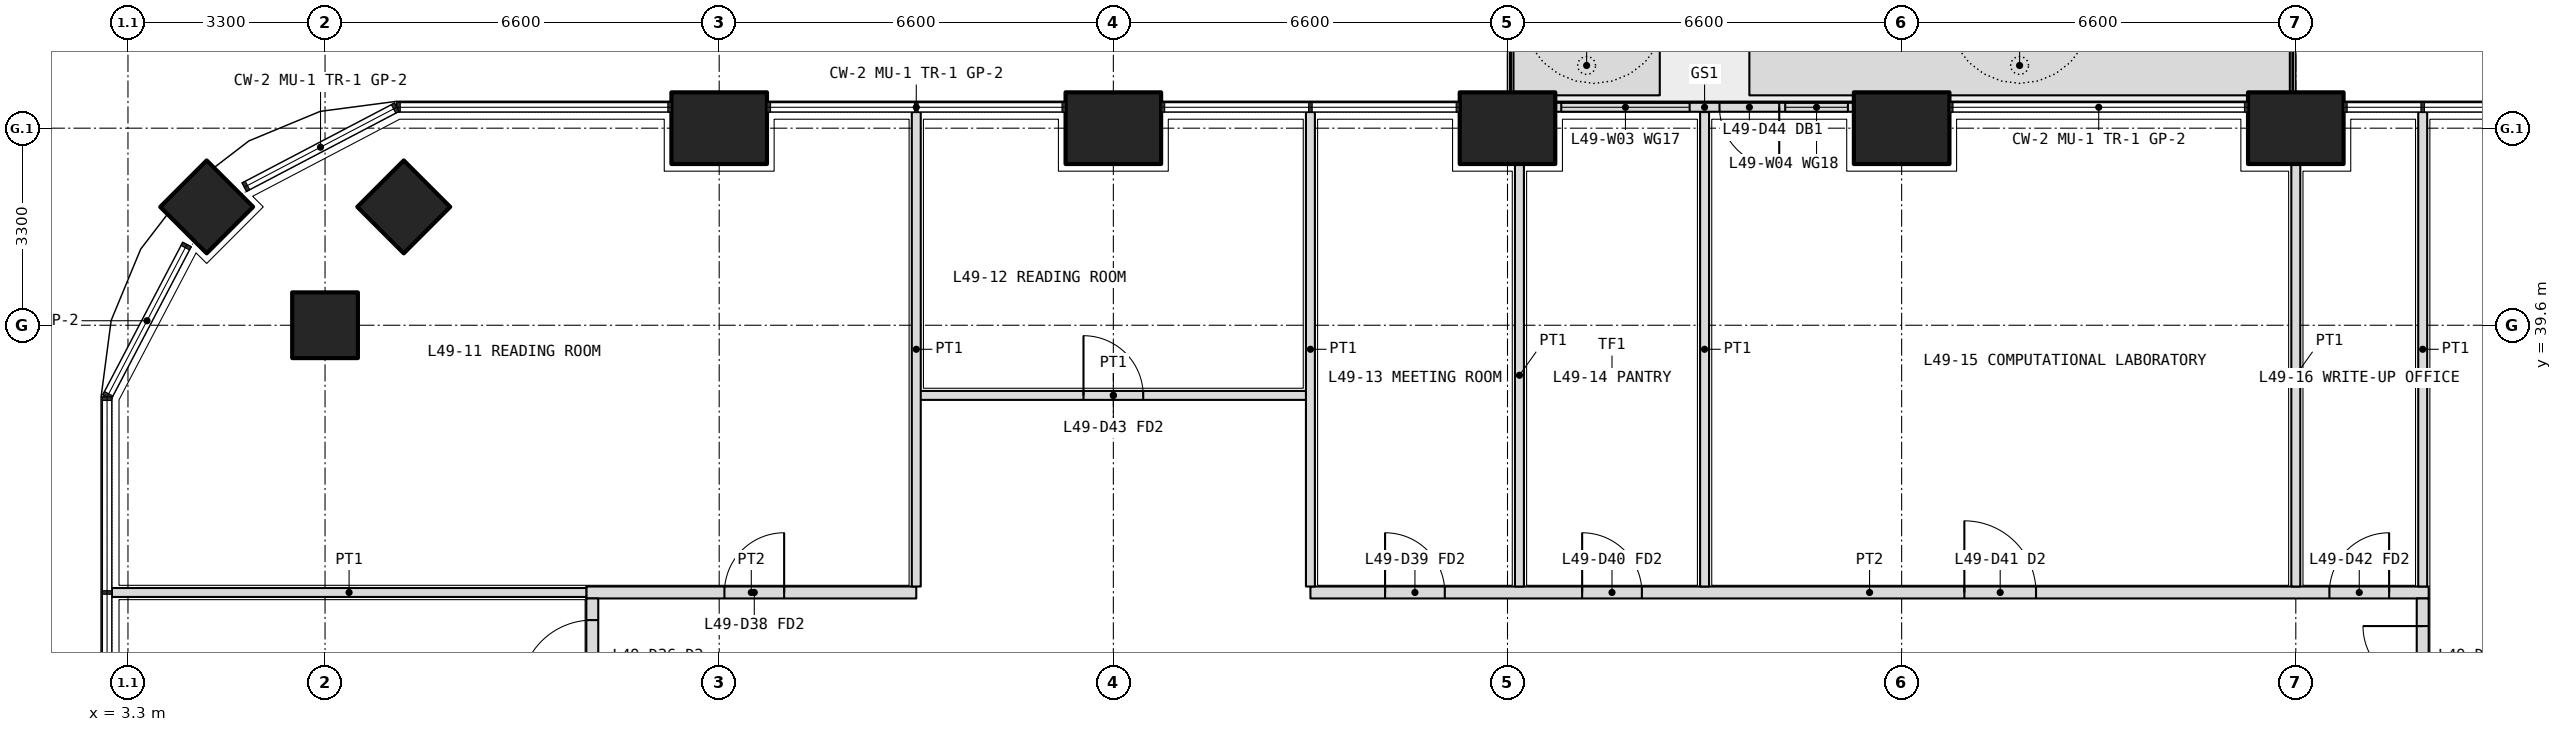
"""IFC4 building model, lengths in metres.
Left out: names, types, materials, properties, quantities, classifications, styles, units other than length and angle.
Written with IfcOpenShell. Run it as: python <this file> out.ifc"""

import sys

from ifc_helpers import new_model, si_unit, direction, frame, frame_2d, origin, origin_2d, place, context, subcontext, project, spatial, polyline, rectangle, outline, extrude, element, fill, save


model = new_model("IFC4")
c1 = context("Model", 3, precision=1e-05, world=origin(), true_north=direction((0.0, 1.0)))
c2 = subcontext(c1, "Body", "Model", "MODEL_VIEW")
j1 = project(units=[si_unit("LENGTHUNIT", "METRE"), si_unit("PLANEANGLEUNIT", "RADIAN")], contexts=[c1])
p1 = place(None, origin())
s1 = spatial("IfcSite", under=j1, at=p1, CompositionType="ELEMENT")
p2 = place(p1, origin())
s2 = spatial("IfcBuilding", under=s1, at=p2, CompositionType="ELEMENT")
p3 = place(p2, frame((0.0, 0.0, 214.5)))
s3 = spatial("IfcBuildingStorey", under=s2, at=p3, CompositionType="ELEMENT", Elevation=214.5)
p4 = place(p3, frame((4.618, 41.582, 0.0), z_axis=(0.0, 0.0, 1.0), x_axis=(0.707106781187, 0.707106781187, 0.0)))
e1 = element("IfcColumn", 1, at=p4, inside=s3, PredefinedType="COLUMN", context=c2, shape_type="SweptSolid", body=[
    extrude(rectangle(XDim=1.1, YDim=1.1, at=origin_2d()), origin(), (0.0, 0.0, 1.0), 4.2),
])
for number, where, z_axis, x_axis in (
    (2, (13.2, 42.9, 0.0), (0.0, 0.0, 1.0), (1.0, 0.0, 0.0)),
    (3, (19.8, 42.9, 0.0), (0.0, 0.0, 1.0), (1.0, 0.0, 0.0)),
    (4, (26.4, 42.9, 0.0), (0.0, 0.0, 1.0), (1.0, 0.0, 0.0)),
    (5, (33.0, 42.9, 0.0), (0.0, 0.0, 1.0), (1.0, 0.0, 0.0)),
    (6, (39.6, 42.9, 0.0), (0.0, 0.0, 1.0), (1.0, 0.0, 0.0)),
):
    element("IfcColumn", number, at=place(p3, frame(where, z_axis=z_axis, x_axis=x_axis)), inside=s3, PredefinedType="COLUMN", context=c2, shape_type="SweptSolid", body=[
        extrude(rectangle(XDim=1.6, YDim=1.2, at=origin_2d()), origin(), (0.0, 0.0, 1.0), 4.2),
    ])
for number, where, z_axis, x_axis in (
    (7, (6.6, 39.6, 0.0), (0.0, 0.0, 1.0), (1.0, 0.0, 0.0)),
    (8, (7.918, 41.582, 0.0), (0.0, 0.0, 1.0), (0.707, 0.707, 0.0)),
):
    element("IfcColumn", number, at=place(p3, frame(where, z_axis=z_axis, x_axis=x_axis)), inside=s3, PredefinedType="COLUMN", context=c2, shape_type="SweptSolid", body=[
        extrude(rectangle(XDim=1.1, YDim=1.1, at=origin_2d()), origin(), (0.0, 0.0, 1.0), 4.2),
    ])
p5 = place(p3, origin())
e9 = element("IfcWall", 9, at=p5, inside=s3, PredefinedType="USERDEFINED", context=c2, shape_type="SweptSolid", body=[
    extrude(outline(polyline([(26.5, 43.45), (28.95, 43.45), (28.95, 44.45), (26.5, 44.45), (26.5, 43.45)]), holes=[polyline([(26.65, 43.6), (28.8, 43.6), (28.8, 44.3), (26.65, 44.3), (26.65, 43.6)])]), origin(), (0.0, 0.0, 1.0), 1.05),
])
p6 = place(p3, origin())
e10 = element("IfcWall", 10, at=p6, inside=s3, PredefinedType="USERDEFINED", context=c2, shape_type="SweptSolid", body=[
    extrude(outline(polyline([(30.45, 43.45), (39.5, 43.45), (39.5, 44.45), (30.45, 44.45), (30.45, 43.45)]), holes=[polyline([(30.6, 43.6), (39.35, 43.6), (39.35, 44.3), (30.6, 44.3), (30.6, 43.6)])]), origin(), (0.0, 0.0, 1.0), 1.05),
])
p7 = place(p3, frame((32.2, 43.25, 0.0), z_axis=(0.0, 0.0, 1.0), x_axis=(-1.0, 0.0, 0.0)))
e11 = element("IfcWall", 11, at=p7, inside=s3, PredefinedType="SOLIDWALL", context=c2, shape_type="SweptSolid", body=[
    extrude(rectangle(XDim=5.0, YDim=0.15, at=frame_2d((2.5, 0.0))), origin(), (0.0, 0.0, 1.0), 2.6),
])
p8 = place(p7, frame((1.25, 0.0, 0.0)))
e12 = element("IfcOpeningElement", 12, at=p8, cuts=e11, PredefinedType="OPENING", context=c2, shape_type="SweptSolid", body=[
    extrude(rectangle(XDim=1.0, YDim=2.4, at=frame_2d((0.5, 1.2))), frame((0.0, 0.085, 0.0), z_axis=(0.0, -1.0, 0.0), x_axis=(1.0, 0.0, 0.0)), (0.0, 0.0, 1.0), 0.17),
])
p9 = place(p7, frame((0.1, 0.0, 0.1)))
e13 = element("IfcOpeningElement", 13, at=p9, cuts=e11, PredefinedType="OPENING", context=c2, shape_type="SweptSolid", body=[
    extrude(rectangle(XDim=1.05, YDim=2.2, at=frame_2d((0.525, 1.1))), frame((0.0, 0.085, 0.0), z_axis=(0.0, -1.0, 0.0), x_axis=(1.0, 0.0, 0.0)), (0.0, 0.0, 1.0), 0.17),
])
p10 = place(p7, frame((2.75, 0.0, 0.1)))
e14 = element("IfcOpeningElement", 14, at=p10, cuts=e11, PredefinedType="OPENING", context=c2, shape_type="SweptSolid", body=[
    extrude(rectangle(XDim=2.15, YDim=2.2, at=frame_2d((1.075, 1.1))), frame((0.0, 0.085, 0.0), z_axis=(0.0, -1.0, 0.0), x_axis=(1.0, 0.0, 0.0)), (0.0, 0.0, 1.0), 0.17),
])
p11 = place(p3, frame((10.975, 35.125, 0.0), z_axis=(0.0, 0.0, 1.0), x_axis=(1.0, 0.0, 0.0)))
e15 = element("IfcWall", 15, at=p11, inside=s3, PredefinedType="PARTITIONING", context=c2, shape_type="SweptSolid", body=[
    extrude(rectangle(XDim=5.525, YDim=0.2, at=frame_2d((2.762, 0.0))), origin(), (0.0, 0.0, 1.0), 2.85),
])
p12 = place(p11, frame((2.312, 0.0, 0.0)))
e16 = element("IfcOpeningElement", 16, at=p12, cuts=e15, PredefinedType="OPENING", context=c2, shape_type="SweptSolid", body=[
    extrude(rectangle(XDim=1.0, YDim=2.1, at=frame_2d((0.5, 1.05))), frame((0.0, 0.11, 0.0), z_axis=(0.0, -1.0, 0.0), x_axis=(1.0, 0.0, 0.0)), (0.0, 0.0, 1.0), 0.22),
])
p13 = place(p3, frame((23.1, 35.125, 0.0), z_axis=(0.0, 0.0, 1.0), x_axis=(1.0, 0.0, 0.0)))
e17 = element("IfcWall", 17, at=p13, inside=s3, PredefinedType="PARTITIONING", context=c2, shape_type="SweptSolid", body=[
    extrude(rectangle(XDim=18.725, YDim=0.2, at=frame_2d((9.362, 0.0))), origin(), (0.0, 0.0, 1.0), 2.85),
])
p14 = place(p13, frame((1.25, 0.0, 0.0)))
e18 = element("IfcOpeningElement", 18, at=p14, cuts=e17, PredefinedType="OPENING", context=c2, shape_type="SweptSolid", body=[
    extrude(rectangle(XDim=1.0, YDim=2.1, at=frame_2d((0.5, 1.05))), frame((0.0, 0.11, 0.0), z_axis=(0.0, -1.0, 0.0), x_axis=(1.0, 0.0, 0.0)), (0.0, 0.0, 1.0), 0.22),
])
p15 = place(p13, frame((4.55, 0.0, 0.0)))
e19 = element("IfcOpeningElement", 19, at=p15, cuts=e17, PredefinedType="OPENING", context=c2, shape_type="SweptSolid", body=[
    extrude(rectangle(XDim=1.0, YDim=2.1, at=frame_2d((0.5, 1.05))), frame((0.0, 0.11, 0.0), z_axis=(0.0, -1.0, 0.0), x_axis=(1.0, 0.0, 0.0)), (0.0, 0.0, 1.0), 0.22),
])
p16 = place(p13, frame((10.95, 0.0, 0.0)))
e20 = element("IfcOpeningElement", 20, at=p16, cuts=e17, PredefinedType="OPENING", context=c2, shape_type="SweptSolid", body=[
    extrude(rectangle(XDim=1.2, YDim=2.1, at=frame_2d((0.6, 1.05))), frame((0.0, 0.11, 0.0), z_axis=(0.0, -1.0, 0.0), x_axis=(1.0, 0.0, 0.0)), (0.0, 0.0, 1.0), 0.22),
])
p17 = place(p13, frame((17.062, 0.0, 0.0)))
e21 = element("IfcOpeningElement", 21, at=p17, cuts=e17, PredefinedType="OPENING", context=c2, shape_type="SweptSolid", body=[
    extrude(rectangle(XDim=1.0, YDim=2.1, at=frame_2d((0.5, 1.05))), frame((0.0, 0.11, 0.0), z_axis=(0.0, -1.0, 0.0), x_axis=(1.0, 0.0, 0.0)), (0.0, 0.0, 1.0), 0.22),
])
p18 = place(p3, frame((11.075, 11.175, 0.0), z_axis=(0.0, 0.0, 1.0), x_axis=(0.0, 1.0, 0.0)))
e22 = element("IfcWall", 22, at=p18, inside=s3, PredefinedType="PARTITIONING", context=c2, shape_type="SweptSolid", body=[
    extrude(rectangle(XDim=23.85, YDim=0.2, at=frame_2d((11.925, 0.0))), origin(), (0.0, 0.0, 1.0), 2.85),
])
p19 = place(p18, frame((0.462, 0.0, 0.0)))
e23 = element("IfcOpeningElement", 23, at=p19, cuts=e22, PredefinedType="OPENING", context=c2, shape_type="SweptSolid", body=[
    extrude(rectangle(XDim=1.0, YDim=2.1, at=frame_2d((0.5, 1.05))), frame((0.0, 0.11, 0.0), z_axis=(0.0, -1.0, 0.0), x_axis=(1.0, 0.0, 0.0)), (0.0, 0.0, 1.0), 0.22),
])
p20 = place(p18, frame((2.575, 0.0, 0.0)))
e24 = element("IfcOpeningElement", 24, at=p20, cuts=e22, PredefinedType="OPENING", context=c2, shape_type="SweptSolid", body=[
    extrude(rectangle(XDim=1.0, YDim=2.1, at=frame_2d((0.5, 1.05))), frame((0.0, 0.11, 0.0), z_axis=(0.0, -1.0, 0.0), x_axis=(1.0, 0.0, 0.0)), (0.0, 0.0, 1.0), 0.22),
])
p21 = place(p18, frame((5.625, 0.0, 0.0)))
e25 = element("IfcOpeningElement", 25, at=p21, cuts=e22, PredefinedType="OPENING", context=c2, shape_type="SweptSolid", body=[
    extrude(rectangle(XDim=0.9, YDim=2.1, at=frame_2d((0.45, 1.05))), frame((0.0, 0.11, 0.0), z_axis=(0.0, -1.0, 0.0), x_axis=(1.0, 0.0, 0.0)), (0.0, 0.0, 1.0), 0.22),
])
p22 = place(p18, frame((9.425, 0.0, 0.0)))
e26 = element("IfcOpeningElement", 26, at=p22, cuts=e22, PredefinedType="OPENING", context=c2, shape_type="SweptSolid", body=[
    extrude(rectangle(XDim=0.9, YDim=2.1, at=frame_2d((0.45, 1.05))), frame((0.0, 0.11, 0.0), z_axis=(0.0, -1.0, 0.0), x_axis=(1.0, 0.0, 0.0)), (0.0, 0.0, 1.0), 0.22),
])
p23 = place(p18, frame((12.975, 0.0, 0.0)))
e27 = element("IfcOpeningElement", 27, at=p23, cuts=e22, PredefinedType="OPENING", context=c2, shape_type="SweptSolid", body=[
    extrude(rectangle(XDim=1.0, YDim=2.1, at=frame_2d((0.5, 1.05))), frame((0.0, 0.11, 0.0), z_axis=(0.0, -1.0, 0.0), x_axis=(1.0, 0.0, 0.0)), (0.0, 0.0, 1.0), 0.22),
])
p24 = place(p18, frame((16.275, 0.0, 0.0)))
e28 = element("IfcOpeningElement", 28, at=p24, cuts=e22, PredefinedType="OPENING", context=c2, shape_type="SweptSolid", body=[
    extrude(rectangle(XDim=1.2, YDim=2.1, at=frame_2d((0.6, 1.05))), frame((0.0, 0.11, 0.0), z_axis=(0.0, -1.0, 0.0), x_axis=(1.0, 0.0, 0.0)), (0.0, 0.0, 1.0), 0.22),
])
p25 = place(p18, frame((19.575, 0.0, 0.0)))
e29 = element("IfcOpeningElement", 29, at=p25, cuts=e22, PredefinedType="OPENING", context=c2, shape_type="SweptSolid", body=[
    extrude(rectangle(XDim=1.2, YDim=2.1, at=frame_2d((0.6, 1.05))), frame((0.0, 0.11, 0.0), z_axis=(0.0, -1.0, 0.0), x_axis=(1.0, 0.0, 0.0)), (0.0, 0.0, 1.0), 0.22),
])
p26 = place(p18, frame((22.288, 0.0, 0.0)))
e30 = element("IfcOpeningElement", 30, at=p26, cuts=e22, PredefinedType="OPENING", context=c2, shape_type="SweptSolid", body=[
    extrude(rectangle(XDim=1.2, YDim=2.1, at=frame_2d((0.6, 1.05))), frame((0.0, 0.11, 0.0), z_axis=(0.0, -1.0, 0.0), x_axis=(1.0, 0.0, 0.0)), (0.0, 0.0, 1.0), 0.22),
])
p27 = place(p3, frame((41.725, 11.175, 0.0), z_axis=(0.0, 0.0, 1.0), x_axis=(0.0, 1.0, 0.0)))
e31 = element("IfcWall", 31, at=p27, inside=s3, PredefinedType="PARTITIONING", context=c2, shape_type="SweptSolid", body=[
    extrude(rectangle(XDim=23.85, YDim=0.2, at=frame_2d((11.925, 0.0))), origin(), (0.0, 0.0, 1.0), 2.85),
])
p28 = place(p27, frame((3.762, 0.0, 0.0)))
e32 = element("IfcOpeningElement", 32, at=p28, cuts=e31, PredefinedType="OPENING", context=c2, shape_type="SweptSolid", body=[
    extrude(rectangle(XDim=1.0, YDim=2.1, at=frame_2d((0.5, 1.05))), frame((0.0, 0.11, 0.0), z_axis=(0.0, -1.0, 0.0), x_axis=(1.0, 0.0, 0.0)), (0.0, 0.0, 1.0), 0.22),
])
p29 = place(p27, frame((9.625, 0.0, 0.0)))
e33 = element("IfcOpeningElement", 33, at=p29, cuts=e31, PredefinedType="OPENING", context=c2, shape_type="SweptSolid", body=[
    extrude(rectangle(XDim=1.0, YDim=2.1, at=frame_2d((0.5, 1.05))), frame((0.0, 0.11, 0.0), z_axis=(0.0, -1.0, 0.0), x_axis=(1.0, 0.0, 0.0)), (0.0, 0.0, 1.0), 0.22),
])
p30 = place(p27, frame((12.975, 0.0, 0.0)))
e34 = element("IfcOpeningElement", 34, at=p30, cuts=e31, PredefinedType="OPENING", context=c2, shape_type="SweptSolid", body=[
    extrude(rectangle(XDim=0.9, YDim=2.1, at=frame_2d((0.45, 1.05))), frame((0.0, 0.11, 0.0), z_axis=(0.0, -1.0, 0.0), x_axis=(1.0, 0.0, 0.0)), (0.0, 0.0, 1.0), 0.22),
])
p31 = place(p27, frame((17.925, 0.0, 0.0)))
e35 = element("IfcOpeningElement", 35, at=p31, cuts=e31, PredefinedType="OPENING", context=c2, shape_type="SweptSolid", body=[
    extrude(rectangle(XDim=1.2, YDim=2.1, at=frame_2d((0.6, 1.05))), frame((0.0, 0.11, 0.0), z_axis=(0.0, -1.0, 0.0), x_axis=(1.0, 0.0, 0.0)), (0.0, 0.0, 1.0), 0.22),
])
p32 = place(p27, frame((22.387, 0.0, 0.0)))
e36 = element("IfcOpeningElement", 36, at=p32, cuts=e31, PredefinedType="OPENING", context=c2, shape_type="SweptSolid", body=[
    extrude(rectangle(XDim=1.0, YDim=2.1, at=frame_2d((0.5, 1.05))), frame((0.0, 0.11, 0.0), z_axis=(0.0, -1.0, 0.0), x_axis=(1.0, 0.0, 0.0)), (0.0, 0.0, 1.0), 0.22),
])
p33 = place(p3, frame((41.725, 43.17, 0.0), z_axis=(0.0, 0.0, 1.0), x_axis=(0.0, -1.0, 0.0)))
e37 = element("IfcWall", 37, at=p33, inside=s3, PredefinedType="PARTITIONING", context=c2, shape_type="SweptSolid", body=[
    extrude(rectangle(XDim=7.945, YDim=0.15, at=frame_2d((3.972, 0.0))), origin(), (0.0, 0.0, 1.0), 2.6),
])
p34 = place(p3, frame((3.03, 35.125, 0.0), z_axis=(0.0, 0.0, 1.0), x_axis=(1.0, 0.0, 0.0)))
e38 = element("IfcWall", 38, at=p34, inside=s3, PredefinedType="PARTITIONING", context=c2, shape_type="SweptSolid", body=[
    extrude(rectangle(XDim=7.945, YDim=0.15, at=frame_2d((3.973, 0.0))), origin(), (0.0, 0.0, 1.0), 2.6),
])
p35 = place(p3, frame((16.5, 38.425, 0.0), z_axis=(0.0, 0.0, 1.0), x_axis=(1.0, 0.0, 0.0)))
e39 = element("IfcWall", 39, at=p35, inside=s3, PredefinedType="PARTITIONING", context=c2, shape_type="SweptSolid", body=[
    extrude(rectangle(XDim=6.6, YDim=0.15, at=frame_2d((3.3, 0.0))), origin(), (0.0, 0.0, 1.0), 2.85),
])
p36 = place(p35, frame((2.8, 0.0, 0.0)))
e40 = element("IfcOpeningElement", 40, at=p36, cuts=e39, PredefinedType="OPENING", context=c2, shape_type="SweptSolid", body=[
    extrude(rectangle(XDim=1.0, YDim=2.1, at=frame_2d((0.5, 1.05))), frame((0.0, 0.085, 0.0), z_axis=(0.0, -1.0, 0.0), x_axis=(1.0, 0.0, 0.0)), (0.0, 0.0, 1.0), 0.17),
])
p37 = place(p3, frame((26.6, 42.3, 0.0), z_axis=(0.0, 0.0, 1.0), x_axis=(0.0, -1.0, 0.0)))
e41 = element("IfcWall", 41, at=p37, inside=s3, PredefinedType="PARTITIONING", context=c2, shape_type="SweptSolid", body=[
    extrude(rectangle(XDim=7.075, YDim=0.15, at=frame_2d((3.538, 0.0))), origin(), (0.0, 0.0, 1.0), 2.85),
])
for number, where, z_axis, x_axis in (
    (42, (29.7, 43.17, 0.0), (0.0, 0.0, 1.0), (0.0, -1.0, 0.0)),
    (43, (16.5, 43.17, 0.0), (0.0, 0.0, 1.0), (0.0, -1.0, 0.0)),
    (44, (23.1, 43.17, 0.0), (0.0, 0.0, 1.0), (0.0, -1.0, 0.0)),
):
    element("IfcWall", number, at=place(p3, frame(where, z_axis=z_axis, x_axis=x_axis)), inside=s3, PredefinedType="PARTITIONING", context=c2, shape_type="SweptSolid", body=[
        extrude(rectangle(XDim=7.945, YDim=0.15, at=frame_2d((3.972, 0.0))), origin(), (0.0, 0.0, 1.0), 2.6),
    ])
p38 = place(p3, frame((39.6, 42.3, 0.0), z_axis=(0.0, 0.0, 1.0), x_axis=(0.0, -1.0, 0.0)))
e45 = element("IfcWall", 45, at=p38, inside=s3, PredefinedType="PARTITIONING", context=c2, shape_type="SweptSolid", body=[
    extrude(rectangle(XDim=7.075, YDim=0.15, at=frame_2d((3.538, 0.0))), origin(), (0.0, 0.0, 1.0), 2.85),
])
p39 = place(p8, origin())
e46 = element("IfcDoor", 46, at=p39, inside=s3, OperationType="SINGLE_SWING_LEFT", PredefinedType="DOOR", context=c2, shape_type="SweptSolid", body=[
    extrude(rectangle(XDim=1.0, YDim=2.4, at=frame_2d((0.5, 1.2))), frame((0.0, 0.025, 0.0), z_axis=(0.0, -1.0, 0.0), x_axis=(1.0, 0.0, 0.0)), (0.0, 0.0, 1.0), 0.05),
])
fill(e12, e46)
p40 = place(p9, origin())
e47 = element("IfcWindow", 47, at=p40, inside=s3, PartitioningType="SINGLE_PANEL", PredefinedType="WINDOW", context=c2, shape_type="SweptSolid", body=[
    extrude(rectangle(XDim=1.05, YDim=2.2, at=frame_2d((0.525, 1.1))), frame((0.0, 0.03, 0.0), z_axis=(0.0, -1.0, 0.0), x_axis=(1.0, 0.0, 0.0)), (0.0, 0.0, 1.0), 0.06),
])
fill(e13, e47)
p41 = place(p10, origin())
e48 = element("IfcWindow", 48, at=p41, inside=s3, PartitioningType="SINGLE_PANEL", PredefinedType="WINDOW", context=c2, shape_type="SweptSolid", body=[
    extrude(rectangle(XDim=2.15, YDim=2.2, at=frame_2d((1.075, 1.1))), frame((0.0, 0.03, 0.0), z_axis=(0.0, -1.0, 0.0), x_axis=(1.0, 0.0, 0.0)), (0.0, 0.0, 1.0), 0.06),
])
fill(e14, e48)
p42 = place(p32, origin())
e49 = element("IfcDoor", 49, at=p42, inside=s3, OperationType="SINGLE_SWING_RIGHT", PredefinedType="DOOR", context=c2, shape_type="SweptSolid", body=[
    extrude(rectangle(XDim=1.0, YDim=2.1, at=frame_2d((0.5, 1.05))), frame((0.0, 0.025, 0.0), z_axis=(0.0, -1.0, 0.0), x_axis=(1.0, 0.0, 0.0)), (0.0, 0.0, 1.0), 0.05),
])
fill(e36, e49)
p43 = place(p12, origin())
e50 = element("IfcDoor", 50, at=p43, inside=s3, OperationType="SINGLE_SWING_RIGHT", PredefinedType="DOOR", context=c2, shape_type="SweptSolid", body=[
    extrude(rectangle(XDim=1.0, YDim=2.1, at=frame_2d((0.5, 1.05))), frame((0.0, 0.025, 0.0), z_axis=(0.0, -1.0, 0.0), x_axis=(1.0, 0.0, 0.0)), (0.0, 0.0, 1.0), 0.05),
])
fill(e16, e50)
p44 = place(p36, origin())
e51 = element("IfcDoor", 51, at=p44, inside=s3, OperationType="SINGLE_SWING_LEFT", PredefinedType="DOOR", context=c2, shape_type="SweptSolid", body=[
    extrude(rectangle(XDim=1.0, YDim=2.1, at=frame_2d((0.5, 1.05))), frame((0.0, 0.025, 0.0), z_axis=(0.0, -1.0, 0.0), x_axis=(1.0, 0.0, 0.0)), (0.0, 0.0, 1.0), 0.05),
])
fill(e40, e51)
p45 = place(p14, origin())
e52 = element("IfcDoor", 52, at=p45, inside=s3, OperationType="SINGLE_SWING_LEFT", PredefinedType="DOOR", context=c2, shape_type="SweptSolid", body=[
    extrude(rectangle(XDim=1.0, YDim=2.1, at=frame_2d((0.5, 1.05))), frame((0.0, 0.025, 0.0), z_axis=(0.0, -1.0, 0.0), x_axis=(1.0, 0.0, 0.0)), (0.0, 0.0, 1.0), 0.05),
])
fill(e18, e52)
p46 = place(p15, origin())
e53 = element("IfcDoor", 53, at=p46, inside=s3, OperationType="SINGLE_SWING_LEFT", PredefinedType="DOOR", context=c2, shape_type="SweptSolid", body=[
    extrude(rectangle(XDim=1.0, YDim=2.1, at=frame_2d((0.5, 1.05))), frame((0.0, 0.025, 0.0), z_axis=(0.0, -1.0, 0.0), x_axis=(1.0, 0.0, 0.0)), (0.0, 0.0, 1.0), 0.05),
])
fill(e19, e53)
p47 = place(p16, origin())
e54 = element("IfcDoor", 54, at=p47, inside=s3, OperationType="DOUBLE_DOOR_SINGLE_SWING", PredefinedType="DOOR", context=c2, shape_type="SweptSolid", body=[
    extrude(rectangle(XDim=1.2, YDim=2.1, at=frame_2d((0.6, 1.05))), frame((0.0, 0.025, 0.0), z_axis=(0.0, -1.0, 0.0), x_axis=(1.0, 0.0, 0.0)), (0.0, 0.0, 1.0), 0.05),
])
fill(e20, e54)
p48 = place(p17, origin())
e55 = element("IfcDoor", 55, at=p48, inside=s3, OperationType="SINGLE_SWING_RIGHT", PredefinedType="DOOR", context=c2, shape_type="SweptSolid", body=[
    extrude(rectangle(XDim=1.0, YDim=2.1, at=frame_2d((0.5, 1.05))), frame((0.0, 0.025, 0.0), z_axis=(0.0, -1.0, 0.0), x_axis=(1.0, 0.0, 0.0)), (0.0, 0.0, 1.0), 0.05),
])
fill(e21, e55)
p49 = place(p26, origin())
e56 = element("IfcDoor", 56, at=p49, inside=s3, OperationType="DOUBLE_DOOR_SINGLE_SWING", PredefinedType="DOOR", context=c2, shape_type="SweptSolid", body=[
    extrude(rectangle(XDim=1.2, YDim=2.1, at=frame_2d((0.6, 1.05))), frame((0.0, 0.025, 0.0), z_axis=(0.0, -1.0, 0.0), x_axis=(1.0, 0.0, 0.0)), (0.0, 0.0, 1.0), 0.05),
])
fill(e30, e56)
save(model, sys.argv[1])
